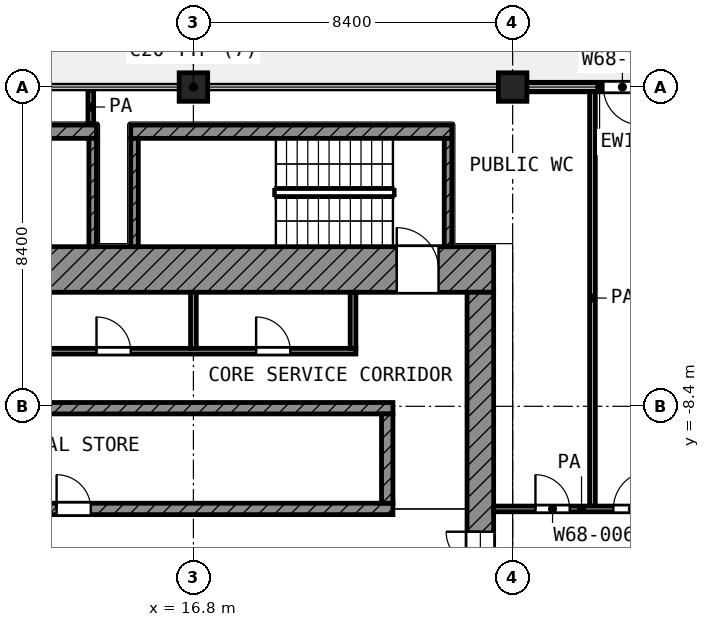
"""IFC4 building model, lengths in metres.
Left out: names, types, materials, properties, quantities, classifications, styles, units other than length and angle.
Written with IfcOpenShell. Run it as: python <this file> out.ifc"""

import sys

from ifc_helpers import new_model, si_unit, direction, frame, frame_2d, origin, origin_2d, place, context, subcontext, project, spatial, rectangle, extrude, element, fill, save


model = new_model("IFC4")
c1 = context("Model", 3, precision=1e-05, world=origin(), true_north=direction((0.0, 1.0)))
c2 = subcontext(c1, "Body", "Model", "MODEL_VIEW")
j1 = project(units=[si_unit("LENGTHUNIT", "METRE"), si_unit("PLANEANGLEUNIT", "RADIAN")], contexts=[c1])
p1 = place(None, origin())
s1 = spatial("IfcSite", under=j1, at=p1, CompositionType="ELEMENT")
p2 = place(p1, origin())
s2 = spatial("IfcBuilding", under=s1, at=p2, CompositionType="ELEMENT")
p3 = place(p2, frame((0.0, 0.0, 315.4)))
s3 = spatial("IfcBuildingStorey", under=s2, at=p3, CompositionType="ELEMENT", Elevation=315.4)
for number, where, z_axis, x_axis in (
    (1, (16.8, 0.0, 0.0), (0.0, 0.0, 1.0), (1.0, 0.0, 0.0)),
    (2, (25.2, 0.0, 0.0), (0.0, 0.0, 1.0), (1.0, 0.0, 0.0)),
):
    element("IfcColumn", number, at=place(p3, frame(where, z_axis=z_axis, x_axis=x_axis)), inside=s3, PredefinedType="COLUMN", context=c2, shape_type="SweptSolid", body=[
        extrude(rectangle(XDim=0.75, YDim=0.75, at=origin_2d()), origin(), (0.0, 0.0, 1.0), 4.2),
    ])
p4 = place(p3, frame((29.4, 0.0, 0.0), z_axis=(0.0, 0.0, 1.0), x_axis=(-1.0, 0.0, 0.0)))
e3 = element("IfcWall", 3, at=p4, inside=s3, PredefinedType="SOLIDWALL", context=c2, shape_type="SweptSolid", body=[
    extrude(rectangle(XDim=3.825, YDim=0.25, at=frame_2d((1.913, 0.0))), origin(), (0.0, 0.0, 1.0), 3.48),
])
p5 = place(p4, frame((0.812, 0.0, 0.0)))
e4 = element("IfcOpeningElement", 4, at=p5, cuts=e3, PredefinedType="OPENING", context=c2, shape_type="SweptSolid", body=[
    extrude(rectangle(XDim=1.0, YDim=2.1, at=frame_2d((0.5, 1.05))), frame((0.0, 0.135, 0.0), z_axis=(0.0, -1.0, 0.0), x_axis=(1.0, 0.0, 0.0)), (0.0, 0.0, 1.0), 0.27),
])
p6 = place(p3, frame((4.2, -4.8, 0.0), z_axis=(0.0, 0.0, 1.0), x_axis=(1.0, 0.0, 0.0)))
e5 = element("IfcWall", 5, at=p6, inside=s3, PredefinedType="SHEAR", context=c2, shape_type="SweptSolid", body=[
    extrude(rectangle(XDim=20.5, YDim=1.2, at=frame_2d((10.25, 0.0))), origin(), (0.0, 0.0, 1.0), 3.6),
])
p7 = place(p6, frame((1.95, 0.0, 0.0)))
e6 = element("IfcOpeningElement", 6, at=p7, cuts=e5, PredefinedType="OPENING", context=c2, shape_type="SweptSolid", body=[
    extrude(rectangle(XDim=1.1, YDim=2.1, at=frame_2d((0.55, 1.05))), frame((0.0, 0.61, 0.0), z_axis=(0.0, -1.0, 0.0), x_axis=(1.0, 0.0, 0.0)), (0.0, 0.0, 1.0), 1.22),
])
p8 = place(p6, frame((17.95, 0.0, 0.0)))
e7 = element("IfcOpeningElement", 7, at=p8, cuts=e5, PredefinedType="OPENING", context=c2, shape_type="SweptSolid", body=[
    extrude(rectangle(XDim=1.1, YDim=2.1, at=frame_2d((0.55, 1.05))), frame((0.0, 0.61, 0.0), z_axis=(0.0, -1.0, 0.0), x_axis=(1.0, 0.0, 0.0)), (0.0, 0.0, 1.0), 1.22),
])
p9 = place(p3, frame((24.35, -24.0, 0.0), z_axis=(0.0, 0.0, 1.0), x_axis=(0.0, 1.0, 0.0)))
e8 = element("IfcWall", 8, at=p9, inside=s3, PredefinedType="SHEAR", context=c2, shape_type="SweptSolid", body=[
    extrude(rectangle(XDim=18.6, YDim=0.7, at=frame_2d((9.3, 0.0))), origin(), (0.0, 0.0, 1.0), 3.6),
])
p10 = place(p9, frame((10.5, 0.0, 0.0)))
e9 = element("IfcOpeningElement", 9, at=p10, cuts=e8, PredefinedType="OPENING", context=c2, shape_type="SweptSolid", body=[
    extrude(rectangle(XDim=1.8, YDim=2.1, at=frame_2d((0.9, 1.05))), frame((0.0, 0.36, 0.0), z_axis=(0.0, -1.0, 0.0), x_axis=(1.0, 0.0, 0.0)), (0.0, 0.0, 1.0), 0.72),
])
p11 = place(p3, frame((5.4, -8.45, 0.0), z_axis=(0.0, 0.0, 1.0), x_axis=(1.0, 0.0, 0.0)))
e10 = element("IfcWall", 10, at=p11, inside=s3, PredefinedType="SHEAR", context=c2, shape_type="SweptSolid", body=[
    extrude(rectangle(XDim=16.65, YDim=0.3, at=frame_2d((8.325, 0.0))), origin(), (0.0, 0.0, 1.0), 3.6),
])
p12 = place(p3, frame((5.4, -11.1, 0.0), z_axis=(0.0, 0.0, 1.0), x_axis=(1.0, 0.0, 0.0)))
e11 = element("IfcWall", 11, at=p12, inside=s3, PredefinedType="SHEAR", context=c2, shape_type="SweptSolid", body=[
    extrude(rectangle(XDim=16.65, YDim=0.3, at=frame_2d((8.325, 0.0))), origin(), (0.0, 0.0, 1.0), 3.6),
])
p13 = place(p12, frame((7.8, 0.0, 0.0)))
e12 = element("IfcOpeningElement", 12, at=p13, cuts=e11, PredefinedType="OPENING", context=c2, shape_type="SweptSolid", body=[
    extrude(rectangle(XDim=0.9, YDim=2.1, at=frame_2d((0.45, 1.05))), frame((0.0, 0.16, 0.0), z_axis=(0.0, -1.0, 0.0), x_axis=(1.0, 0.0, 0.0)), (0.0, 0.0, 1.0), 0.32),
])
p14 = place(p3, frame((21.9, -10.95, 0.0), z_axis=(0.0, 0.0, 1.0), x_axis=(0.0, 1.0, 0.0)))
e13 = element("IfcWall", 13, at=p14, inside=s3, PredefinedType="SHEAR", context=c2, shape_type="SweptSolid", body=[
    extrude(rectangle(XDim=2.35, YDim=0.3, at=frame_2d((1.175, 0.0))), origin(), (0.0, 0.0, 1.0), 3.6),
])
p15 = place(p3, frame((8.325, -6.95, 0.0), z_axis=(0.0, 0.0, 1.0), x_axis=(1.0, 0.0, 0.0)))
e14 = element("IfcWall", 14, at=p15, inside=s3, PredefinedType="PARTITIONING", context=c2, shape_type="SweptSolid", body=[
    extrude(rectangle(XDim=12.75, YDim=0.15, at=frame_2d((6.375, 0.0))), origin(), (0.0, 0.0, 1.0), 3.6),
])
p16 = place(p15, frame((1.725, 0.0, 0.0)))
e15 = element("IfcOpeningElement", 15, at=p16, cuts=e14, PredefinedType="OPENING", context=c2, shape_type="SweptSolid", body=[
    extrude(rectangle(XDim=0.9, YDim=2.1, at=frame_2d((0.45, 1.05))), frame((0.0, 0.085, 0.0), z_axis=(0.0, -1.0, 0.0), x_axis=(1.0, 0.0, 0.0)), (0.0, 0.0, 1.0), 0.17),
])
p17 = place(p15, frame((5.925, 0.0, 0.0)))
e16 = element("IfcOpeningElement", 16, at=p17, cuts=e14, PredefinedType="OPENING", context=c2, shape_type="SweptSolid", body=[
    extrude(rectangle(XDim=0.9, YDim=2.1, at=frame_2d((0.45, 1.05))), frame((0.0, 0.085, 0.0), z_axis=(0.0, -1.0, 0.0), x_axis=(1.0, 0.0, 0.0)), (0.0, 0.0, 1.0), 0.17),
])
p18 = place(p15, frame((10.125, 0.0, 0.0)))
e17 = element("IfcOpeningElement", 17, at=p18, cuts=e14, PredefinedType="OPENING", context=c2, shape_type="SweptSolid", body=[
    extrude(rectangle(XDim=0.9, YDim=2.1, at=frame_2d((0.45, 1.05))), frame((0.0, 0.085, 0.0), z_axis=(0.0, -1.0, 0.0), x_axis=(1.0, 0.0, 0.0)), (0.0, 0.0, 1.0), 0.17),
])
for number, where, z_axis, x_axis in (
    (18, (16.8, -6.875, 0.0), (0.0, 0.0, 1.0), (0.0, 1.0, 0.0)),
    (19, (21.0, -6.875, 0.0), (0.0, 0.0, 1.0), (0.0, 1.0, 0.0)),
):
    element("IfcWall", number, at=place(p3, frame(where, z_axis=z_axis, x_axis=x_axis)), inside=s3, PredefinedType="PARTITIONING", context=c2, shape_type="SweptSolid", body=[
        extrude(rectangle(XDim=1.475, YDim=0.15, at=frame_2d((0.738, 0.0))), origin(), (0.0, 0.0, 1.0), 3.6),
    ])
p19 = place(p3, frame((5.8, -1.175, 0.0), z_axis=(0.0, 0.0, 1.0), x_axis=(1.0, 0.0, 0.0)))
e20 = element("IfcWall", 20, at=p19, inside=s3, PredefinedType="SHEAR", context=c2, shape_type="SweptSolid", body=[
    extrude(rectangle(XDim=8.45, YDim=0.35, at=frame_2d((4.225, 0.0))), origin(), (0.0, 0.0, 1.0), 3.6),
])
p20 = place(p3, frame((14.15, -4.2, 0.0), z_axis=(0.0, 0.0, 1.0), x_axis=(0.0, 1.0, 0.0)))
e21 = element("IfcWall", 21, at=p20, inside=s3, PredefinedType="SHEAR", context=c2, shape_type="SweptSolid", body=[
    extrude(rectangle(XDim=2.85, YDim=0.2, at=frame_2d((1.425, 0.0))), origin(), (0.0, 0.0, 1.0), 3.6),
])
p21 = place(p3, frame((15.15, -1.175, 0.0), z_axis=(0.0, 0.0, 1.0), x_axis=(1.0, 0.0, 0.0)))
e22 = element("IfcWall", 22, at=p21, inside=s3, PredefinedType="SHEAR", context=c2, shape_type="SweptSolid", body=[
    extrude(rectangle(XDim=8.45, YDim=0.35, at=frame_2d((4.225, 0.0))), origin(), (0.0, 0.0, 1.0), 3.6),
])
for number, where, z_axis, x_axis in (
    (23, (15.25, -4.2, 0.0), (0.0, 0.0, 1.0), (0.0, 1.0, 0.0)),
    (24, (23.5, -4.2, 0.0), (0.0, 0.0, 1.0), (0.0, 1.0, 0.0)),
):
    element("IfcWall", number, at=place(p3, frame(where, z_axis=z_axis, x_axis=x_axis)), inside=s3, PredefinedType="SHEAR", context=c2, shape_type="SweptSolid", body=[
        extrude(rectangle(XDim=2.85, YDim=0.2, at=frame_2d((1.425, 0.0))), origin(), (0.0, 0.0, 1.0), 3.6),
    ])
p22 = place(p3, frame((24.7, -11.1, 0.0), z_axis=(0.0, 0.0, 1.0), x_axis=(1.0, 0.0, 0.0)))
e25 = element("IfcWall", 25, at=p22, inside=s3, PredefinedType="PARTITIONING", context=c2, shape_type="SweptSolid", body=[
    extrude(rectangle(XDim=4.625, YDim=0.15, at=frame_2d((2.312, 0.0))), origin(), (0.0, 0.0, 1.0), 3.6),
])
p23 = place(p22, frame((1.1, 0.0, 0.0)))
e26 = element("IfcOpeningElement", 26, at=p23, cuts=e25, PredefinedType="OPENING", context=c2, shape_type="SweptSolid", body=[
    extrude(rectangle(XDim=0.9, YDim=2.1, at=frame_2d((0.45, 1.05))), frame((0.0, 0.085, 0.0), z_axis=(0.0, -1.0, 0.0), x_axis=(1.0, 0.0, 0.0)), (0.0, 0.0, 1.0), 0.17),
])
p24 = place(p22, frame((3.15, 0.0, 0.0)))
e27 = element("IfcOpeningElement", 27, at=p24, cuts=e25, PredefinedType="OPENING", context=c2, shape_type="SweptSolid", body=[
    extrude(rectangle(XDim=1.0, YDim=2.1, at=frame_2d((0.5, 1.05))), frame((0.0, 0.085, 0.0), z_axis=(0.0, -1.0, 0.0), x_axis=(1.0, 0.0, 0.0)), (0.0, 0.0, 1.0), 0.17),
])
p25 = place(p3, frame((14.1, -0.97, 0.0), z_axis=(0.0, 0.0, 1.0), x_axis=(0.0, 1.0, 0.0)))
e28 = element("IfcWall", 28, at=p25, inside=s3, PredefinedType="PARTITIONING", context=c2, shape_type="SweptSolid", body=[
    extrude(rectangle(XDim=0.89, YDim=0.15, at=frame_2d((0.445, 0.0))), origin(), (0.0, 0.0, 1.0), 3.6),
])
p26 = place(p3, frame((27.3, -11.025, 0.0), z_axis=(0.0, 0.0, 1.0), x_axis=(0.0, 1.0, 0.0)))
e29 = element("IfcWall", 29, at=p26, inside=s3, PredefinedType="PARTITIONING", context=c2, shape_type="SweptSolid", body=[
    extrude(rectangle(XDim=10.945, YDim=0.15, at=frame_2d((5.472, 0.0))), origin(), (0.0, 0.0, 1.0), 3.6),
])
p27 = place(p5, origin())
e30 = element("IfcDoor", 30, at=p27, inside=s3, OperationType="SINGLE_SWING_LEFT", PredefinedType="DOOR", context=c2, shape_type="SweptSolid", body=[
    extrude(rectangle(XDim=1.0, YDim=2.1, at=frame_2d((0.5, 1.05))), frame((0.0, 0.025, 0.0), z_axis=(0.0, -1.0, 0.0), x_axis=(1.0, 0.0, 0.0)), (0.0, 0.0, 1.0), 0.05),
])
fill(e4, e30)
p28 = place(p8, origin())
e31 = element("IfcDoor", 31, at=p28, inside=s3, OperationType="SINGLE_SWING_LEFT", PredefinedType="DOOR", context=c2, shape_type="SweptSolid", body=[
    extrude(rectangle(XDim=1.1, YDim=2.1, at=frame_2d((0.55, 1.05))), frame((0.0, 0.025, 0.0), z_axis=(0.0, -1.0, 0.0), x_axis=(1.0, 0.0, 0.0)), (0.0, 0.0, 1.0), 0.05),
])
fill(e7, e31)
p29 = place(p10, origin())
e32 = element("IfcDoor", 32, at=p29, inside=s3, OperationType="DOUBLE_DOOR_SINGLE_SWING", PredefinedType="DOOR", context=c2, shape_type="SweptSolid", body=[
    extrude(rectangle(XDim=1.8, YDim=2.1, at=frame_2d((0.9, 1.05))), frame((0.0, 0.025, 0.0), z_axis=(0.0, -1.0, 0.0), x_axis=(1.0, 0.0, 0.0)), (0.0, 0.0, 1.0), 0.05),
])
fill(e9, e32)
p30 = place(p17, origin())
e33 = element("IfcDoor", 33, at=p30, inside=s3, OperationType="SINGLE_SWING_LEFT", PredefinedType="DOOR", context=c2, shape_type="SweptSolid", body=[
    extrude(rectangle(XDim=0.9, YDim=2.1, at=frame_2d((0.45, 1.05))), frame((0.0, 0.025, 0.0), z_axis=(0.0, -1.0, 0.0), x_axis=(1.0, 0.0, 0.0)), (0.0, 0.0, 1.0), 0.05),
])
fill(e16, e33)
p31 = place(p18, origin())
e34 = element("IfcDoor", 34, at=p31, inside=s3, OperationType="SINGLE_SWING_LEFT", PredefinedType="DOOR", context=c2, shape_type="SweptSolid", body=[
    extrude(rectangle(XDim=0.9, YDim=2.1, at=frame_2d((0.45, 1.05))), frame((0.0, 0.025, 0.0), z_axis=(0.0, -1.0, 0.0), x_axis=(1.0, 0.0, 0.0)), (0.0, 0.0, 1.0), 0.05),
])
fill(e17, e34)
p32 = place(p13, origin())
e35 = element("IfcDoor", 35, at=p32, inside=s3, OperationType="SINGLE_SWING_LEFT", PredefinedType="DOOR", context=c2, shape_type="SweptSolid", body=[
    extrude(rectangle(XDim=0.9, YDim=2.1, at=frame_2d((0.45, 1.05))), frame((0.0, 0.025, 0.0), z_axis=(0.0, -1.0, 0.0), x_axis=(1.0, 0.0, 0.0)), (0.0, 0.0, 1.0), 0.05),
])
fill(e12, e35)
p33 = place(p23, origin())
e36 = element("IfcDoor", 36, at=p33, inside=s3, OperationType="SINGLE_SWING_LEFT", PredefinedType="DOOR", context=c2, shape_type="SweptSolid", body=[
    extrude(rectangle(XDim=0.9, YDim=2.1, at=frame_2d((0.45, 1.05))), frame((0.0, 0.025, 0.0), z_axis=(0.0, -1.0, 0.0), x_axis=(1.0, 0.0, 0.0)), (0.0, 0.0, 1.0), 0.05),
])
fill(e26, e36)
p34 = place(p24, origin())
e37 = element("IfcDoor", 37, at=p34, inside=s3, OperationType="SINGLE_SWING_RIGHT", PredefinedType="DOOR", context=c2, shape_type="SweptSolid", body=[
    extrude(rectangle(XDim=1.0, YDim=2.1, at=frame_2d((0.5, 1.05))), frame((0.0, 0.025, 0.0), z_axis=(0.0, -1.0, 0.0), x_axis=(1.0, 0.0, 0.0)), (0.0, 0.0, 1.0), 0.05),
])
fill(e27, e37)
save(model, sys.argv[1])
